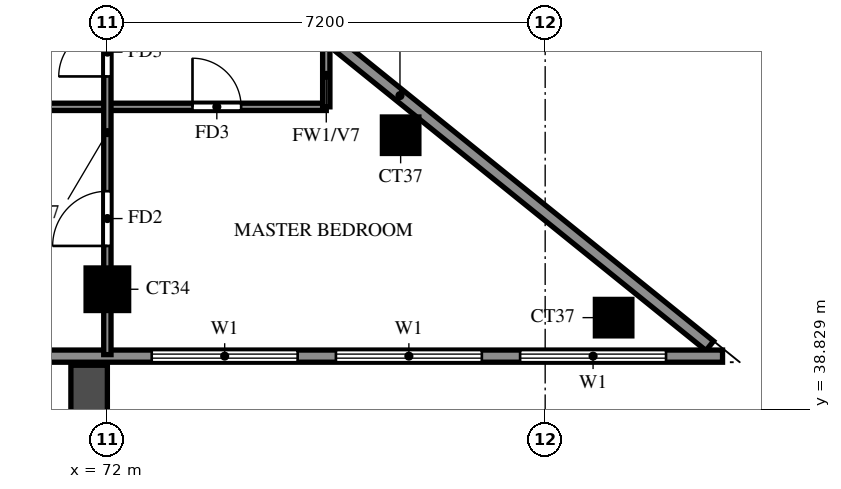
"""IFC4 building model, lengths in metres.
Left out: names, types, materials, properties, quantities, classifications, styles, units other than length and angle.
Written with IfcOpenShell. Run it as: python <this file> out.ifc"""

import sys

from ifc_helpers import new_model, si_unit, direction, frame, frame_2d, origin, origin_2d, place, context, subcontext, project, spatial, rectangle, extrude, source, transform, mapped, element, fill, save


model = new_model("IFC4")
c1 = context("Model", 3, precision=1e-05, world=origin(), true_north=direction((0.0, 1.0)))
c2 = subcontext(c1, "Body", "Model", "MODEL_VIEW")
j1 = project(units=[si_unit("LENGTHUNIT", "METRE"), si_unit("PLANEANGLEUNIT", "RADIAN")], contexts=[c1])
p1 = place(None, origin())
s1 = spatial("IfcSite", under=j1, at=p1, CompositionType="ELEMENT")
p2 = place(p1, origin())
s2 = spatial("IfcBuilding", under=s1, at=p2, CompositionType="ELEMENT")
p3 = place(p2, frame((0.0, 0.0, 253.5)))
s3 = spatial("IfcBuildingStorey", under=s2, at=p3, CompositionType="ELEMENT", Elevation=253.5)
m1 = source(origin(), c2, "Body", "SweptSolid", [
    extrude(rectangle(XDim=0.6, YDim=0.6, at=origin_2d()), origin(), (0.0, 0.0, 1.0), 3.22),
])
p4 = place(p3, frame((80.326, 40.333, 0.0), z_axis=(0.0, 0.0, 1.0), x_axis=(1.0, 0.0, 0.0)))
e1 = element("IfcColumn", 1, at=p4, inside=s3, PredefinedType="COLUMN", context=c2, shape_type="MappedRepresentation", body=[
    mapped(m1, transform((0.0, 0.0, 0.0))),
])
m2 = source(origin(), c2, "Body", "SweptSolid", [
    extrude(rectangle(XDim=0.7, YDim=0.7, at=origin_2d()), origin(), (0.0, 0.0, 1.0), 3.22),
])
p5 = place(p3, frame((72.0, 40.8, 0.0), z_axis=(0.0, 0.0, 1.0), x_axis=(1.0, 0.0, 0.0)))
e2 = element("IfcColumn", 2, at=p5, inside=s3, PredefinedType="COLUMN", context=c2, shape_type="MappedRepresentation", body=[
    mapped(m2, transform((0.0, 0.0, 0.0))),
])
p6 = place(p3, frame((76.823, 43.333, 0.0), z_axis=(0.0, 0.0, 1.0), x_axis=(1.0, 0.0, 0.0)))
e3 = element("IfcColumn", 3, at=p6, inside=s3, PredefinedType="COLUMN", context=c2, shape_type="MappedRepresentation", body=[
    mapped(m1, transform((0.0, 0.0, 0.0))),
])
p7 = place(p3, frame((81.907, 39.87, 0.0), z_axis=(0.0, 0.0, 1.0), x_axis=(-0.777936274417, 0.62834318087, 0.0)))
e4 = element("IfcWall", 4, at=p7, inside=s3, PredefinedType="SOLIDWALL", context=c2, shape_type="SweptSolid", body=[
    extrude(rectangle(XDim=13.099, YDim=0.2, at=frame_2d((6.549, 0.0))), origin(), (0.0, 0.0, 1.0), 3.22),
])
p8 = place(p7, frame((9.938, 0.0, 1.5)))
e5 = element("IfcOpeningElement", 5, at=p8, cuts=e4, PredefinedType="OPENING", context=c2, shape_type="SweptSolid", body=[
    extrude(rectangle(XDim=0.9, YDim=0.9, at=frame_2d((0.45, 0.45))), frame((0.0, 0.11, 0.0), z_axis=(0.0, -1.0, 0.0), x_axis=(1.0, 0.0, 0.0)), (0.0, 0.0, 1.0), 0.22),
])
p9 = place(p3, frame((58.8, 39.7, 0.0), z_axis=(0.0, 0.0, 1.0), x_axis=(1.0, 0.0, 0.0)))
e6 = element("IfcWall", 6, at=p9, inside=s3, PredefinedType="SOLIDWALL", context=c2, shape_type="SweptSolid", body=[
    extrude(rectangle(XDim=23.317, YDim=0.2, at=frame_2d((11.658, 0.0))), origin(), (0.0, 0.0, 1.0), 3.22),
])
p10 = place(p9, frame((7.5, 0.0, 0.0)))
e7 = element("IfcOpeningElement", 7, at=p10, cuts=e6, PredefinedType="OPENING", context=c2, shape_type="SweptSolid", body=[
    extrude(rectangle(XDim=1.8, YDim=2.4, at=frame_2d((0.9, 1.2))), frame((0.0, 0.11, 0.0), z_axis=(0.0, -1.0, 0.0), x_axis=(1.0, 0.0, 0.0)), (0.0, 0.0, 1.0), 0.22),
])
p11 = place(p9, frame((2.4, 0.0, 0.6)))
e8 = element("IfcOpeningElement", 8, at=p11, cuts=e6, PredefinedType="OPENING", context=c2, shape_type="SweptSolid", body=[
    extrude(rectangle(XDim=2.4, YDim=2.4, at=frame_2d((1.2, 1.2))), frame((0.0, 0.11, 0.0), z_axis=(0.0, -1.0, 0.0), x_axis=(1.0, 0.0, 0.0)), (0.0, 0.0, 1.0), 0.22),
])
p12 = place(p9, frame((13.929, 0.0, 0.6)))
e9 = element("IfcOpeningElement", 9, at=p12, cuts=e6, PredefinedType="OPENING", context=c2, shape_type="SweptSolid", body=[
    extrude(rectangle(XDim=2.4, YDim=2.4, at=frame_2d((1.2, 1.2))), frame((0.0, 0.11, 0.0), z_axis=(0.0, -1.0, 0.0), x_axis=(1.0, 0.0, 0.0)), (0.0, 0.0, 1.0), 0.22),
])
p13 = place(p9, frame((16.958, 0.0, 0.6)))
e10 = element("IfcOpeningElement", 10, at=p13, cuts=e6, PredefinedType="OPENING", context=c2, shape_type="SweptSolid", body=[
    extrude(rectangle(XDim=2.4, YDim=2.4, at=frame_2d((1.2, 1.2))), frame((0.0, 0.11, 0.0), z_axis=(0.0, -1.0, 0.0), x_axis=(1.0, 0.0, 0.0)), (0.0, 0.0, 1.0), 0.22),
])
p14 = place(p9, frame((19.988, 0.0, 0.6)))
e11 = element("IfcOpeningElement", 11, at=p14, cuts=e6, PredefinedType="OPENING", context=c2, shape_type="SweptSolid", body=[
    extrude(rectangle(XDim=2.4, YDim=2.4, at=frame_2d((1.2, 1.2))), frame((0.0, 0.11, 0.0), z_axis=(0.0, -1.0, 0.0), x_axis=(1.0, 0.0, 0.0)), (0.0, 0.0, 1.0), 0.22),
])
p15 = place(p3, frame((71.7, 39.55, 0.0), z_axis=(0.0, 0.0, 1.0), x_axis=(0.0, -1.0, 0.0)))
e12 = element("IfcWall", 12, at=p15, inside=s3, PredefinedType="SOLIDWALL", context=c2, shape_type="SweptSolid", body=[
    extrude(rectangle(XDim=2.65, YDim=0.6, at=frame_2d((1.325, 0.0))), origin(), (0.0, 0.0, 1.0), 2.85),
])
p16 = place(p3, frame((60.0, 43.8, 0.0), z_axis=(0.0, 0.0, 1.0), x_axis=(1.0, 0.0, 0.0)))
e13 = element("IfcWall", 13, at=p16, inside=s3, PredefinedType="PARTITIONING", context=c2, shape_type="SweptSolid", body=[
    extrude(rectangle(XDim=15.6, YDim=0.12, at=frame_2d((7.8, 0.0))), origin(), (0.0, 0.0, 1.0), 3.22),
])
p17 = place(p16, frame((9.75, 0.0, 0.0)))
e14 = element("IfcOpeningElement", 14, at=p17, cuts=e13, PredefinedType="OPENING", context=c2, shape_type="SweptSolid", body=[
    extrude(rectangle(XDim=0.9, YDim=2.1, at=frame_2d((0.45, 1.05))), frame((0.0, 0.07, 0.0), z_axis=(0.0, -1.0, 0.0), x_axis=(1.0, 0.0, 0.0)), (0.0, 0.0, 1.0), 0.14),
])
p18 = place(p16, frame((3.45, 0.0, 0.0)))
e15 = element("IfcOpeningElement", 15, at=p18, cuts=e13, PredefinedType="OPENING", context=c2, shape_type="SweptSolid", body=[
    extrude(rectangle(XDim=1.5, YDim=2.1, at=frame_2d((0.75, 1.05))), frame((0.0, 0.07, 0.0), z_axis=(0.0, -1.0, 0.0), x_axis=(1.0, 0.0, 0.0)), (0.0, 0.0, 1.0), 0.14),
])
p19 = place(p16, frame((13.4, 0.0, 0.0)))
e16 = element("IfcOpeningElement", 16, at=p19, cuts=e13, PredefinedType="OPENING", context=c2, shape_type="SweptSolid", body=[
    extrude(rectangle(XDim=0.8, YDim=2.1, at=frame_2d((0.4, 1.05))), frame((0.0, 0.07, 0.0), z_axis=(0.0, -1.0, 0.0), x_axis=(1.0, 0.0, 0.0)), (0.0, 0.0, 1.0), 0.14),
])
p20 = place(p3, frame((72.0, 39.725, 0.0), z_axis=(0.0, 0.0, 1.0), x_axis=(0.0, 1.0, 0.0)))
e17 = element("IfcWall", 17, at=p20, inside=s3, PredefinedType="PARTITIONING", context=c2, shape_type="SweptSolid", body=[
    extrude(rectangle(XDim=8.114, YDim=0.12, at=frame_2d((4.057, 0.0))), origin(), (0.0, 0.0, 1.0), 2.32),
])
p21 = place(p20, frame((1.788, 0.0, 0.0)))
e18 = element("IfcOpeningElement", 18, at=p21, cuts=e17, PredefinedType="OPENING", context=c2, shape_type="SweptSolid", body=[
    extrude(rectangle(XDim=0.9, YDim=2.1, at=frame_2d((0.45, 1.05))), frame((0.0, 0.07, 0.0), z_axis=(0.0, -1.0, 0.0), x_axis=(1.0, 0.0, 0.0)), (0.0, 0.0, 1.0), 0.14),
])
p22 = place(p20, frame((4.575, 0.0, 0.0)))
e19 = element("IfcOpeningElement", 19, at=p22, cuts=e17, PredefinedType="OPENING", context=c2, shape_type="SweptSolid", body=[
    extrude(rectangle(XDim=0.8, YDim=2.1, at=frame_2d((0.4, 1.05))), frame((0.0, 0.07, 0.0), z_axis=(0.0, -1.0, 0.0), x_axis=(1.0, 0.0, 0.0)), (0.0, 0.0, 1.0), 0.14),
])
p23 = place(p3, frame((75.6, 43.8, 0.0), z_axis=(0.0, 0.0, 1.0), x_axis=(0.0, 1.0, 0.0)))
e20 = element("IfcWall", 20, at=p23, inside=s3, PredefinedType="PARTITIONING", context=c2, shape_type="SweptSolid", body=[
    extrude(rectangle(XDim=1.035, YDim=0.12, at=frame_2d((0.518, 0.0))), origin(), (0.0, 0.0, 1.0), 2.32),
])
p24 = place(p12, origin())
e21 = element("IfcWindow", 21, at=p24, inside=s3, PartitioningType="DOUBLE_PANEL_VERTICAL", PredefinedType="WINDOW", context=c2, shape_type="SweptSolid", body=[
    extrude(rectangle(XDim=2.4, YDim=2.4, at=frame_2d((1.2, 1.2))), frame((0.0, 0.03, 0.0), z_axis=(0.0, -1.0, 0.0), x_axis=(1.0, 0.0, 0.0)), (0.0, 0.0, 1.0), 0.06),
])
fill(e9, e21)
p25 = place(p13, origin())
e22 = element("IfcWindow", 22, at=p25, inside=s3, PartitioningType="DOUBLE_PANEL_VERTICAL", PredefinedType="WINDOW", context=c2, shape_type="SweptSolid", body=[
    extrude(rectangle(XDim=2.4, YDim=2.4, at=frame_2d((1.2, 1.2))), frame((0.0, 0.03, 0.0), z_axis=(0.0, -1.0, 0.0), x_axis=(1.0, 0.0, 0.0)), (0.0, 0.0, 1.0), 0.06),
])
fill(e10, e22)
p26 = place(p14, origin())
e23 = element("IfcWindow", 23, at=p26, inside=s3, PartitioningType="DOUBLE_PANEL_VERTICAL", PredefinedType="WINDOW", context=c2, shape_type="SweptSolid", body=[
    extrude(rectangle(XDim=2.4, YDim=2.4, at=frame_2d((1.2, 1.2))), frame((0.0, 0.03, 0.0), z_axis=(0.0, -1.0, 0.0), x_axis=(1.0, 0.0, 0.0)), (0.0, 0.0, 1.0), 0.06),
])
fill(e11, e23)
p27 = place(p21, origin())
e24 = element("IfcDoor", 24, at=p27, inside=s3, OperationType="SINGLE_SWING_RIGHT", PredefinedType="DOOR", context=c2, shape_type="SweptSolid", body=[
    extrude(rectangle(XDim=0.9, YDim=2.1, at=frame_2d((0.45, 1.05))), frame((0.0, 0.025, 0.0), z_axis=(0.0, -1.0, 0.0), x_axis=(1.0, 0.0, 0.0)), (0.0, 0.0, 1.0), 0.05),
])
fill(e18, e24)
p28 = place(p22, origin())
e25 = element("IfcDoor", 25, at=p28, inside=s3, OperationType="SINGLE_SWING_LEFT", PredefinedType="DOOR", context=c2, shape_type="SweptSolid", body=[
    extrude(rectangle(XDim=0.8, YDim=2.1, at=frame_2d((0.4, 1.05))), frame((0.0, 0.025, 0.0), z_axis=(0.0, -1.0, 0.0), x_axis=(1.0, 0.0, 0.0)), (0.0, 0.0, 1.0), 0.05),
])
fill(e19, e25)
p29 = place(p19, origin())
e26 = element("IfcDoor", 26, at=p29, inside=s3, OperationType="SINGLE_SWING_RIGHT", PredefinedType="DOOR", context=c2, shape_type="SweptSolid", body=[
    extrude(rectangle(XDim=0.8, YDim=2.1, at=frame_2d((0.4, 1.05))), frame((0.0, 0.025, 0.0), z_axis=(0.0, -1.0, 0.0), x_axis=(1.0, 0.0, 0.0)), (0.0, 0.0, 1.0), 0.05),
])
fill(e16, e26)
save(model, sys.argv[1])
